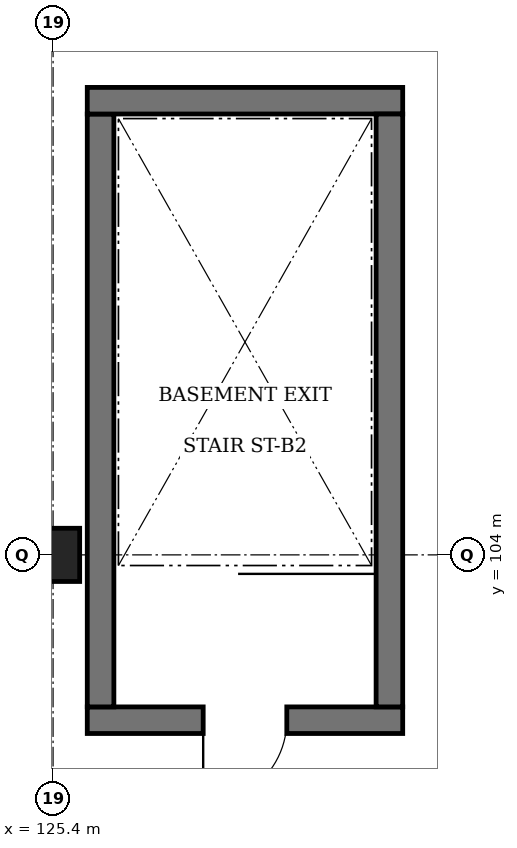
"""IFC4 building model, lengths in metres.
Left out: names, types, materials, properties, quantities, classifications, styles, units other than length and angle.
Written with IfcOpenShell. Run it as: python <this file> out.ifc"""

import sys

from ifc_helpers import new_model, si_unit, direction, frame, frame_2d, origin, origin_2d, place, context, subcontext, project, spatial, rectangle, extrude, element, fill, save


model = new_model("IFC4")
c1 = context("Model", 3, precision=1e-05, world=origin(), true_north=direction((0.0, 1.0)))
c2 = subcontext(c1, "Body", "Model", "MODEL_VIEW")
j1 = project(units=[si_unit("LENGTHUNIT", "METRE"), si_unit("PLANEANGLEUNIT", "RADIAN")], contexts=[c1])
p1 = place(None, origin())
s1 = spatial("IfcSite", under=j1, at=p1, CompositionType="ELEMENT")
p2 = place(p1, origin())
s2 = spatial("IfcBuilding", under=s1, at=p2, CompositionType="ELEMENT")
p3 = place(p2, origin())
s3 = spatial("IfcBuildingStorey", under=s2, at=p3, CompositionType="ELEMENT", Elevation=0.0)
p4 = place(p3, frame((125.4, 104.0, 0.0), z_axis=(0.0, 0.0, 1.0), x_axis=(1.0, 0.0, 0.0)))
e1 = element("IfcColumn", 1, at=p4, inside=s3, PredefinedType="COLUMN", context=c2, shape_type="SweptSolid", body=[
    extrude(rectangle(XDim=0.7, YDim=0.7, at=origin_2d()), origin(), (0.0, 0.0, 1.0), 4.8),
])
p5 = place(p3, frame((130.0, 101.825, 0.0), z_axis=(0.0, 0.0, 1.0), x_axis=(-1.0, 0.0, 0.0)))
e2 = element("IfcWall", 2, at=p5, inside=s3, PredefinedType="SOLIDWALL", context=c2, shape_type="SweptSolid", body=[
    extrude(rectangle(XDim=4.15, YDim=0.35, at=frame_2d((2.075, 0.0))), origin(), (0.0, 0.0, 1.0), 4.54),
])
p6 = place(p5, frame((1.525, 0.0, 0.0)))
e3 = element("IfcOpeningElement", 3, at=p6, cuts=e2, PredefinedType="OPENING", context=c2, shape_type="SweptSolid", body=[
    extrude(rectangle(XDim=1.1, YDim=2.15, at=frame_2d((0.55, 1.075))), frame((0.0, 0.195, 0.0), z_axis=(0.0, -1.0, 0.0), x_axis=(1.0, 0.0, 0.0)), (0.0, 0.0, 1.0), 0.39),
])
p7 = place(p3, frame((126.025, 102.0, 0.0), z_axis=(0.0, 0.0, 1.0), x_axis=(0.0, 1.0, 0.0)))
e4 = element("IfcWall", 4, at=p7, inside=s3, PredefinedType="SOLIDWALL", context=c2, shape_type="SweptSolid", body=[
    extrude(rectangle(XDim=7.8, YDim=0.35, at=frame_2d((3.9, 0.0))), origin(), (0.0, 0.0, 1.0), 4.54),
])
p8 = place(p3, frame((125.85, 109.975, 0.0), z_axis=(0.0, 0.0, 1.0), x_axis=(1.0, 0.0, 0.0)))
e5 = element("IfcWall", 5, at=p8, inside=s3, PredefinedType="SOLIDWALL", context=c2, shape_type="SweptSolid", body=[
    extrude(rectangle(XDim=4.15, YDim=0.35, at=frame_2d((2.075, 0.0))), origin(), (0.0, 0.0, 1.0), 4.54),
])
p9 = place(p3, frame((129.825, 109.8, 0.0), z_axis=(0.0, 0.0, 1.0), x_axis=(0.0, -1.0, 0.0)))
e6 = element("IfcWall", 6, at=p9, inside=s3, PredefinedType="SOLIDWALL", context=c2, shape_type="SweptSolid", body=[
    extrude(rectangle(XDim=7.8, YDim=0.35, at=frame_2d((3.9, 0.0))), origin(), (0.0, 0.0, 1.0), 4.54),
])
p10 = place(p6, origin())
e7 = element("IfcDoor", 7, at=p10, inside=s3, OperationType="SINGLE_SWING_RIGHT", PredefinedType="DOOR", context=c2, shape_type="SweptSolid", body=[
    extrude(rectangle(XDim=1.1, YDim=2.15, at=frame_2d((0.55, 1.075))), frame((0.0, 0.025, 0.0), z_axis=(0.0, -1.0, 0.0), x_axis=(1.0, 0.0, 0.0)), (0.0, 0.0, 1.0), 0.05),
])
fill(e3, e7)
save(model, sys.argv[1])
